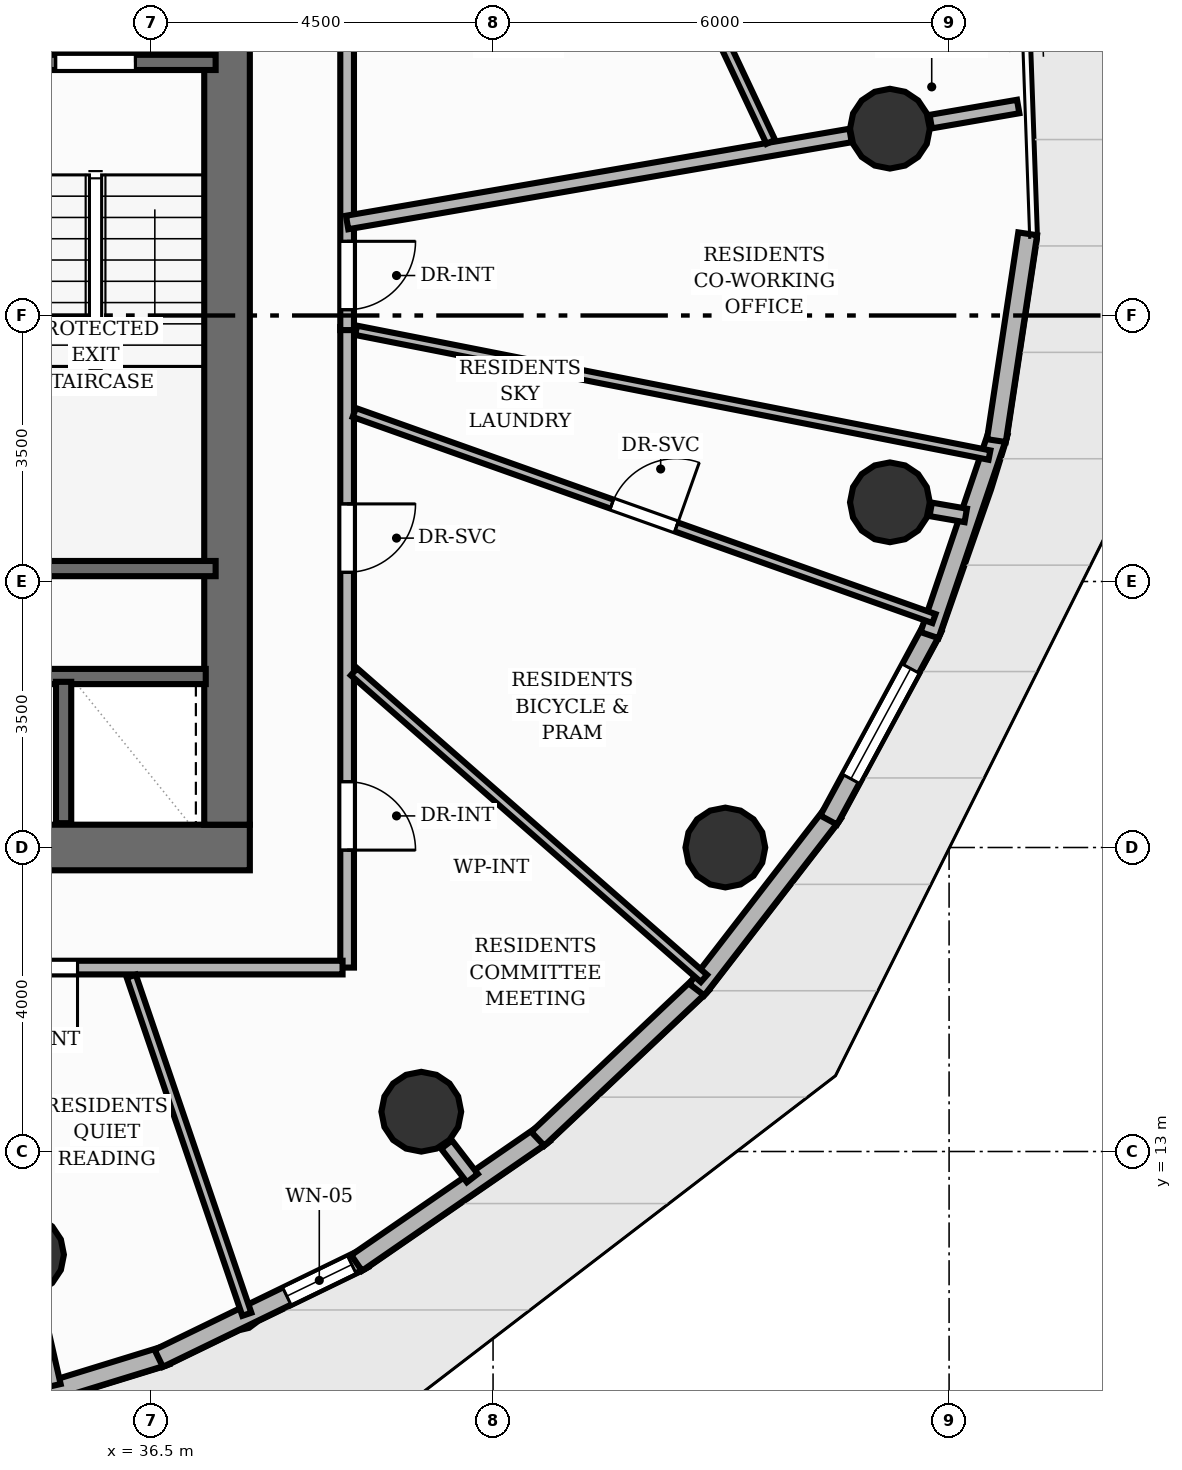
"""IFC4 building model, lengths in metres.
Left out: names, types, materials, properties, quantities, classifications, styles, units other than length and angle.
Written with IfcOpenShell. Run it as: python <this file> out.ifc"""

import sys

from ifc_helpers import new_model, si_unit, direction, frame, frame_2d, origin, origin_2d, place, context, subcontext, project, spatial, rectangle, circle, extrude, element, fill, save


model = new_model("IFC4")
c1 = context("Model", 3, precision=1e-05, world=origin(), true_north=direction((0.0, 1.0)))
c2 = subcontext(c1, "Body", "Model", "MODEL_VIEW")
j1 = project(units=[si_unit("LENGTHUNIT", "METRE"), si_unit("PLANEANGLEUNIT", "RADIAN")], contexts=[c1])
p1 = place(None, origin())
s1 = spatial("IfcSite", under=j1, at=p1, CompositionType="ELEMENT")
p2 = place(p1, origin())
s2 = spatial("IfcBuilding", under=s1, at=p2, CompositionType="ELEMENT")
p3 = place(p2, frame((0.0, 0.0, 123.36)))
s3 = spatial("IfcBuildingStorey", under=s2, at=p3, CompositionType="ELEMENT", Elevation=123.36)
p4 = place(p3, frame((22.7, 17.0, 0.0), z_axis=(0.0, 0.0, 1.0), x_axis=(1.0, 0.0, 0.0)))
e1 = element("IfcWall", 1, at=p4, inside=s3, PredefinedType="SHEAR", context=c2, shape_type="SweptSolid", body=[
    extrude(rectangle(XDim=15.1, YDim=0.6, at=frame_2d((7.55, 0.0))), origin(), (0.0, 0.0, 1.0), 3.2),
])
p5 = place(p4, frame((5.8, 0.0, 0.0)))
e2 = element("IfcOpeningElement", 2, at=p5, cuts=e1, PredefinedType="OPENING", context=c2, shape_type="SweptSolid", body=[
    extrude(rectangle(XDim=1.1, YDim=2.15, at=frame_2d((0.55, 1.075))), frame((0.0, 0.31, 0.0), z_axis=(0.0, -1.0, 0.0), x_axis=(1.0, 0.0, 0.0)), (0.0, 0.0, 1.0), 0.62),
])
p6 = place(p4, frame((9.35, 0.0, 0.0)))
e3 = element("IfcOpeningElement", 3, at=p6, cuts=e1, PredefinedType="OPENING", context=c2, shape_type="SweptSolid", body=[
    extrude(rectangle(XDim=0.9, YDim=2.1, at=frame_2d((0.45, 1.05))), frame((0.0, 0.31, 0.0), z_axis=(0.0, -1.0, 0.0), x_axis=(1.0, 0.0, 0.0)), (0.0, 0.0, 1.0), 0.62),
])
p7 = place(p3, frame((37.5, 17.3, 0.0), z_axis=(0.0, 0.0, 1.0), x_axis=(0.0, 1.0, 0.0)))
e4 = element("IfcWall", 4, at=p7, inside=s3, PredefinedType="SHEAR", context=c2, shape_type="SweptSolid", body=[
    extrude(rectangle(XDim=13.4, YDim=0.6, at=frame_2d((6.7, 0.0))), origin(), (0.0, 0.0, 1.0), 3.2),
])
for number, where, z_axis, x_axis in (
    (5, (46.221, 26.458, 0.0), (0.0, 0.0, 1.0), (1.0, 0.0, 0.0)),
    (6, (34.829, 11.642, 0.0), (0.0, 0.0, 1.0), (1.0, 0.0, 0.0)),
    (7, (40.056, 13.523, 0.0), (0.0, 0.0, 1.0), (1.0, 0.0, 0.0)),
    (8, (44.056, 17.0, 0.0), (0.0, 0.0, 1.0), (1.0, 0.0, 0.0)),
    (9, (46.221, 21.542, 0.0), (0.0, 0.0, 1.0), (1.0, 0.0, 0.0)),
):
    element("IfcColumn", number, at=place(p3, frame(where, z_axis=z_axis, x_axis=x_axis)), inside=s3, PredefinedType="COLUMN", context=c2, shape_type="SweptSolid", body=[
        extrude(circle(Radius=0.525, at=origin_2d()), origin(), (0.0, 0.0, 1.0), 3.2),
    ])
p8 = place(p3, frame((36.702, 10.319, 0.0), z_axis=(0.0, 0.0, 1.0), x_axis=(-0.955653025963, -0.294494981227, 0.0)))
e10 = element("IfcWall", 10, at=p8, inside=s3, PredefinedType="SOLIDWALL", context=c2, shape_type="SweptSolid", body=[
    extrude(rectangle(XDim=2.977, YDim=0.25, at=frame_2d((1.489, 0.0))), origin(), (0.0, 0.0, 1.0), 2.96),
])
p9 = place(p3, frame((39.299, 11.588, 0.0), z_axis=(0.0, 0.0, 1.0), x_axis=(-0.899657133161, -0.436597117206, 0.0)))
e11 = element("IfcWall", 11, at=p9, inside=s3, PredefinedType="SOLIDWALL", context=c2, shape_type="SweptSolid", body=[
    extrude(rectangle(XDim=2.998, YDim=0.25, at=frame_2d((1.499, 0.0))), origin(), (0.0, 0.0, 1.0), 2.96),
])
p10 = place(p9, frame((0.175, 0.0, 0.85)))
e12 = element("IfcOpeningElement", 12, at=p10, cuts=e11, PredefinedType="OPENING", context=c2, shape_type="SweptSolid", body=[
    extrude(rectangle(XDim=0.95, YDim=1.45, at=frame_2d((0.475, 0.725))), frame((0.0, 0.135, 0.0), z_axis=(0.0, -1.0, 0.0), x_axis=(1.0, 0.0, 0.0)), (0.0, 0.0, 1.0), 0.27),
])
p11 = place(p3, frame((41.673, 13.235, 0.0), z_axis=(0.0, 0.0, 1.0), x_axis=(-0.823228532994, -0.567710121863, 0.0)))
e13 = element("IfcWall", 13, at=p11, inside=s3, PredefinedType="SOLIDWALL", context=c2, shape_type="SweptSolid", body=[
    extrude(rectangle(XDim=2.998, YDim=0.25, at=frame_2d((1.499, 0.0))), origin(), (0.0, 0.0, 1.0), 2.96),
])
p12 = place(p3, frame((43.753, 15.211, 0.0), z_axis=(0.0, 0.0, 1.0), x_axis=(-0.727113217486, -0.686517566386, 0.0)))
e14 = element("IfcWall", 14, at=p12, inside=s3, PredefinedType="SOLIDWALL", context=c2, shape_type="SweptSolid", body=[
    extrude(rectangle(XDim=2.977, YDim=0.25, at=frame_2d((1.488, 0.0))), origin(), (0.0, 0.0, 1.0), 2.96),
])
p13 = place(p3, frame((45.475, 17.454, 0.0), z_axis=(0.0, 0.0, 1.0), x_axis=(-0.611416743811, -0.791308767415, 0.0)))
e15 = element("IfcWall", 15, at=p13, inside=s3, PredefinedType="SOLIDWALL", context=c2, shape_type="SweptSolid", body=[
    extrude(rectangle(XDim=2.937, YDim=0.25, at=frame_2d((1.468, 0.0))), origin(), (0.0, 0.0, 1.0), 2.96),
])
p14 = place(p3, frame((46.787, 19.896, 0.0), z_axis=(0.0, 0.0, 1.0), x_axis=(-0.476018404115, -0.879435318226, 0.0)))
e16 = element("IfcWall", 16, at=p14, inside=s3, PredefinedType="SOLIDWALL", context=c2, shape_type="SweptSolid", body=[
    extrude(rectangle(XDim=2.882, YDim=0.25, at=frame_2d((1.441, 0.0))), origin(), (0.0, 0.0, 1.0), 2.96),
])
p15 = place(p14, frame((0.616, 0.0, 0.85)))
e17 = element("IfcOpeningElement", 17, at=p15, cuts=e16, PredefinedType="OPENING", context=c2, shape_type="SweptSolid", body=[
    extrude(rectangle(XDim=1.65, YDim=1.55, at=frame_2d((0.825, 0.775))), frame((0.0, 0.135, 0.0), z_axis=(0.0, -1.0, 0.0), x_axis=(1.0, 0.0, 0.0)), (0.0, 0.0, 1.0), 0.27),
])
p16 = place(p3, frame((47.649, 22.462, 0.0), z_axis=(0.0, 0.0, 1.0), x_axis=(-0.321473951892, -0.946918422175, 0.0)))
e18 = element("IfcWall", 18, at=p16, inside=s3, PredefinedType="SOLIDWALL", context=c2, shape_type="SweptSolid", body=[
    extrude(rectangle(XDim=2.818, YDim=0.25, at=frame_2d((1.409, 0.0))), origin(), (0.0, 0.0, 1.0), 2.96),
])
p17 = place(p3, frame((48.034, 25.075, 0.0), z_axis=(0.0, 0.0, 1.0), x_axis=(-0.149576734229, -0.988750120393, 0.0)))
e19 = element("IfcWall", 19, at=p17, inside=s3, PredefinedType="SOLIDWALL", context=c2, shape_type="SweptSolid", body=[
    extrude(rectangle(XDim=2.752, YDim=0.25, at=frame_2d((1.376, 0.0))), origin(), (0.0, 0.0, 1.0), 2.96),
])
p18 = place(p3, frame((34.11, 20.67, 0.0), z_axis=(0.0, 0.0, 1.0), x_axis=(1.0, 0.0, 0.0)))
e20 = element("IfcWall", 20, at=p18, inside=s3, PredefinedType="SHEAR", context=c2, shape_type="SweptSolid", body=[
    extrude(rectangle(XDim=3.24, YDim=0.2, at=frame_2d((1.62, 0.0))), origin(), (0.0, 0.0, 1.0), 3.2),
])
p19 = place(p3, frame((34.11, 27.33, 0.0), z_axis=(0.0, 0.0, 1.0), x_axis=(1.0, 0.0, 0.0)))
e21 = element("IfcWall", 21, at=p19, inside=s3, PredefinedType="SHEAR", context=c2, shape_type="SweptSolid", body=[
    extrude(rectangle(XDim=3.24, YDim=0.2, at=frame_2d((1.62, 0.0))), origin(), (0.0, 0.0, 1.0), 3.2),
])
p20 = place(p19, frame((1.135, 0.0, 0.0)))
e22 = element("IfcOpeningElement", 22, at=p20, cuts=e21, PredefinedType="OPENING", context=c2, shape_type="SweptSolid", body=[
    extrude(rectangle(XDim=1.05, YDim=2.15, at=frame_2d((0.525, 1.075))), frame((0.0, 0.11, 0.0), z_axis=(0.0, -1.0, 0.0), x_axis=(1.0, 0.0, 0.0)), (0.0, 0.0, 1.0), 0.22),
])
p21 = place(p3, frame((33.5, 19.25, 0.0), z_axis=(0.0, 0.0, 1.0), x_axis=(1.0, 0.0, 0.0)))
e23 = element("IfcWall", 23, at=p21, inside=s3, PredefinedType="SHEAR", context=c2, shape_type="SweptSolid", body=[
    extrude(rectangle(XDim=3.72, YDim=0.2, at=frame_2d((1.86, 0.0))), origin(), (0.0, 0.0, 1.0), 3.2),
])
p22 = place(p3, frame((35.35, 17.32, 0.0), z_axis=(0.0, 0.0, 1.0), x_axis=(0.0, 1.0, 0.0)))
e24 = element("IfcWall", 24, at=p22, inside=s3, PredefinedType="SHEAR", context=c2, shape_type="SweptSolid", body=[
    extrude(rectangle(XDim=1.86, YDim=0.2, at=frame_2d((0.93, 0.0))), origin(), (0.0, 0.0, 1.0), 3.2),
])
p23 = place(p3, frame((46.758, 26.551, 0.0), z_axis=(0.0, 0.0, 1.0), x_axis=(0.98537549431, 0.170396992969, 0.0)))
e25 = element("IfcWall", 25, at=p23, inside=s3, PredefinedType="PARTITIONING", context=c2, shape_type="SweptSolid", body=[
    extrude(rectangle(XDim=1.168, YDim=0.18, at=frame_2d((0.584, 0.0))), origin(), (0.0, 0.0, 1.0), 2.336),
])
p24 = place(p3, frame((34.95, 11.111, 0.0), z_axis=(0.0, 0.0, 1.0), x_axis=(0.223107064029, -0.974793946422, 0.0)))
e26 = element("IfcWall", 26, at=p24, inside=s3, PredefinedType="PARTITIONING", context=c2, shape_type="SweptSolid", body=[
    extrude(rectangle(XDim=1.221, YDim=0.18, at=frame_2d((0.611, 0.0))), origin(), (0.0, 0.0, 1.0), 2.336),
])
p25 = place(p3, frame((40.388, 13.092, 0.0), z_axis=(0.0, 0.0, 1.0), x_axis=(0.609498830183, -0.792786967605, 0.0)))
e27 = element("IfcWall", 27, at=p25, inside=s3, PredefinedType="PARTITIONING", context=c2, shape_type="SweptSolid", body=[
    extrude(rectangle(XDim=0.557, YDim=0.18, at=frame_2d((0.278, 0.0))), origin(), (0.0, 0.0, 1.0), 2.336),
])
p26 = place(p3, frame((46.758, 21.449, 0.0), z_axis=(0.0, 0.0, 1.0), x_axis=(0.985345448397, -0.170570651999, 0.0)))
e28 = element("IfcWall", 28, at=p26, inside=s3, PredefinedType="PARTITIONING", context=c2, shape_type="SweptSolid", body=[
    extrude(rectangle(XDim=0.468, YDim=0.18, at=frame_2d((0.234, 0.0))), origin(), (0.0, 0.0, 1.0), 2.336),
])
p27 = place(p3, frame((39.08, 23.848, 0.0), z_axis=(0.0, 0.0, 1.0), x_axis=(0.0, -1.0, 0.0)))
e29 = element("IfcWall", 29, at=p27, inside=s3, PredefinedType="PARTITIONING", context=c2, shape_type="SweptSolid", body=[
    extrude(rectangle(XDim=8.428, YDim=0.18, at=frame_2d((4.214, 0.0))), origin(), (0.0, 0.0, 1.0), 2.955),
])
p28 = place(p27, frame((2.327, 0.0, 0.0)))
e30 = element("IfcOpeningElement", 30, at=p28, cuts=e29, PredefinedType="OPENING", context=c2, shape_type="SweptSolid", body=[
    extrude(rectangle(XDim=0.9, YDim=2.1, at=frame_2d((0.45, 1.05))), frame((0.0, 0.1, 0.0), z_axis=(0.0, -1.0, 0.0), x_axis=(1.0, 0.0, 0.0)), (0.0, 0.0, 1.0), 0.2),
])
p29 = place(p27, frame((5.983, 0.0, 0.0)))
e31 = element("IfcOpeningElement", 31, at=p29, cuts=e29, PredefinedType="OPENING", context=c2, shape_type="SweptSolid", body=[
    extrude(rectangle(XDim=0.9, YDim=2.1, at=frame_2d((0.45, 1.05))), frame((0.0, 0.1, 0.0), z_axis=(0.0, -1.0, 0.0), x_axis=(1.0, 0.0, 0.0)), (0.0, 0.0, 1.0), 0.2),
])
p30 = place(p3, frame((39.02, 15.42, 0.0), z_axis=(0.0, 0.0, 1.0), x_axis=(-1.0, 0.0, 0.0)))
e32 = element("IfcWall", 32, at=p30, inside=s3, PredefinedType="PARTITIONING", context=c2, shape_type="SweptSolid", body=[
    extrude(rectangle(XDim=9.922, YDim=0.18, at=frame_2d((4.961, 0.0))), origin(), (0.0, 0.0, 1.0), 2.955),
])
p31 = place(p30, frame((3.487, 0.0, 0.0)))
e33 = element("IfcOpeningElement", 33, at=p31, cuts=e32, PredefinedType="OPENING", context=c2, shape_type="SweptSolid", body=[
    extrude(rectangle(XDim=0.9, YDim=2.1, at=frame_2d((0.45, 1.05))), frame((0.0, 0.1, 0.0), z_axis=(0.0, -1.0, 0.0), x_axis=(1.0, 0.0, 0.0)), (0.0, 0.0, 1.0), 0.2),
])
p32 = place(p30, frame((6.571, 0.0, 0.0)))
e34 = element("IfcOpeningElement", 34, at=p32, cuts=e32, PredefinedType="OPENING", context=c2, shape_type="SweptSolid", body=[
    extrude(rectangle(XDim=0.9, YDim=2.1, at=frame_2d((0.45, 1.05))), frame((0.0, 0.1, 0.0), z_axis=(0.0, -1.0, 0.0), x_axis=(1.0, 0.0, 0.0)), (0.0, 0.0, 1.0), 0.2),
])
p33 = place(p3, frame((39.08, 30.158, 0.0), z_axis=(0.0, 0.0, 1.0), x_axis=(0.0, -1.0, 0.0)))
e35 = element("IfcWall", 35, at=p33, inside=s3, PredefinedType="PARTITIONING", context=c2, shape_type="SweptSolid", body=[
    extrude(rectangle(XDim=6.35, YDim=0.18, at=frame_2d((3.175, 0.0))), origin(), (0.0, 0.0, 1.0), 2.955),
])
p34 = place(p33, frame((5.182, 0.0, 0.0)))
e36 = element("IfcOpeningElement", 36, at=p34, cuts=e35, PredefinedType="OPENING", context=c2, shape_type="SweptSolid", body=[
    extrude(rectangle(XDim=0.9, YDim=2.1, at=frame_2d((0.45, 1.05))), frame((0.0, 0.1, 0.0), z_axis=(0.0, -1.0, 0.0), x_axis=(1.0, 0.0, 0.0)), (0.0, 0.0, 1.0), 0.2),
])
p35 = place(p3, frame((43.775, 15.277, 0.0), z_axis=(0.0, 0.0, 1.0), x_axis=(-0.752092313191, 0.659057776252, 0.0)))
e37 = element("IfcWall", 37, at=p35, inside=s3, PredefinedType="PARTITIONING", context=c2, shape_type="SweptSolid", body=[
    extrude(rectangle(XDim=6.122, YDim=0.125, at=frame_2d((3.061, 0.0))), origin(), (0.0, 0.0, 1.0), 2.955),
])
p36 = place(p3, frame((39.174, 22.723, 0.0), z_axis=(0.0, 0.0, 1.0), x_axis=(0.942245152982, -0.334923978959, 0.0)))
e38 = element("IfcWall", 38, at=p36, inside=s3, PredefinedType="PARTITIONING", context=c2, shape_type="SweptSolid", body=[
    extrude(rectangle(XDim=8.094, YDim=0.125, at=frame_2d((4.047, 0.0))), origin(), (0.0, 0.0, 1.0), 2.336),
])
p37 = place(p36, frame((3.597, 0.0, 0.0)))
e39 = element("IfcOpeningElement", 39, at=p37, cuts=e38, PredefinedType="OPENING", context=c2, shape_type="SweptSolid", body=[
    extrude(rectangle(XDim=0.9, YDim=2.1, at=frame_2d((0.45, 1.05))), frame((0.0, 0.073, 0.0), z_axis=(0.0, -1.0, 0.0), x_axis=(1.0, 0.0, 0.0)), (0.0, 0.0, 1.0), 0.145),
])
p38 = place(p3, frame((37.76, 10.858, 0.0), z_axis=(0.0, 0.0, 1.0), x_axis=(-0.323447862149, 0.946245993635, 0.0)))
e40 = element("IfcWall", 40, at=p38, inside=s3, PredefinedType="PARTITIONING", context=c2, shape_type="SweptSolid", body=[
    extrude(rectangle(XDim=4.701, YDim=0.125, at=frame_2d((2.351, 0.0))), origin(), (0.0, 0.0, 1.0), 2.955),
])
p39 = place(p3, frame((47.531, 22.163, 0.0), z_axis=(0.0, 0.0, 1.0), x_axis=(-0.981139353497, 0.19330175638, 0.0)))
e41 = element("IfcWall", 41, at=p39, inside=s3, PredefinedType="PARTITIONING", context=c2, shape_type="SweptSolid", body=[
    extrude(rectangle(XDim=8.494, YDim=0.125, at=frame_2d((4.247, 0.0))), origin(), (0.0, 0.0, 1.0), 2.692),
])
p40 = place(p3, frame((39.08, 25.224, 0.0), z_axis=(0.0, 0.0, 1.0), x_axis=(0.985384524795, 0.17034476304, 0.0)))
e42 = element("IfcWall", 42, at=p40, inside=s3, PredefinedType="PARTITIONING", context=c2, shape_type="SweptSolid", body=[
    extrude(rectangle(XDim=6.722, YDim=0.18, at=frame_2d((3.361, 0.0))), origin(), (0.0, 0.0, 1.0), 2.336),
])
p41 = place(p3, frame((44.653, 26.285, 0.0), z_axis=(0.0, 0.0, 1.0), x_axis=(-0.426326363779, 0.90456941776, 0.0)))
e43 = element("IfcWall", 43, at=p41, inside=s3, PredefinedType="PARTITIONING", context=c2, shape_type="SweptSolid", body=[
    extrude(rectangle(XDim=6.729, YDim=0.125, at=frame_2d((3.365, 0.0))), origin(), (0.0, 0.0, 1.0), 2.955),
])
p42 = place(p10, origin())
e44 = element("IfcWindow", 44, at=p42, inside=s3, PartitioningType="SINGLE_PANEL", PredefinedType="WINDOW", context=c2, shape_type="SweptSolid", body=[
    extrude(rectangle(XDim=0.95, YDim=1.45, at=frame_2d((0.475, 0.725))), frame((0.0, 0.03, 0.0), z_axis=(0.0, -1.0, 0.0), x_axis=(1.0, 0.0, 0.0)), (0.0, 0.0, 1.0), 0.06),
])
fill(e12, e44)
p43 = place(p15, origin())
e45 = element("IfcWindow", 45, at=p43, inside=s3, PartitioningType="SINGLE_PANEL", PredefinedType="WINDOW", context=c2, shape_type="SweptSolid", body=[
    extrude(rectangle(XDim=1.65, YDim=1.55, at=frame_2d((0.825, 0.775))), frame((0.0, 0.03, 0.0), z_axis=(0.0, -1.0, 0.0), x_axis=(1.0, 0.0, 0.0)), (0.0, 0.0, 1.0), 0.06),
])
fill(e17, e45)
p44 = place(p20, origin())
e46 = element("IfcDoor", 46, at=p44, inside=s3, OperationType="SINGLE_SWING_RIGHT", PredefinedType="DOOR", context=c2, shape_type="SweptSolid", body=[
    extrude(rectangle(XDim=1.05, YDim=2.15, at=frame_2d((0.525, 1.075))), frame((0.0, 0.025, 0.0), z_axis=(0.0, -1.0, 0.0), x_axis=(1.0, 0.0, 0.0)), (0.0, 0.0, 1.0), 0.05),
])
fill(e22, e46)
p45 = place(p28, origin())
e47 = element("IfcDoor", 47, at=p45, inside=s3, OperationType="SINGLE_SWING_LEFT", PredefinedType="DOOR", context=c2, shape_type="SweptSolid", body=[
    extrude(rectangle(XDim=0.9, YDim=2.1, at=frame_2d((0.45, 1.05))), frame((0.0, 0.025, 0.0), z_axis=(0.0, -1.0, 0.0), x_axis=(1.0, 0.0, 0.0)), (0.0, 0.0, 1.0), 0.05),
])
fill(e30, e47)
p46 = place(p29, origin())
e48 = element("IfcDoor", 48, at=p46, inside=s3, OperationType="SINGLE_SWING_RIGHT", PredefinedType="DOOR", context=c2, shape_type="SweptSolid", body=[
    extrude(rectangle(XDim=0.9, YDim=2.1, at=frame_2d((0.45, 1.05))), frame((0.0, 0.025, 0.0), z_axis=(0.0, -1.0, 0.0), x_axis=(1.0, 0.0, 0.0)), (0.0, 0.0, 1.0), 0.05),
])
fill(e31, e48)
p47 = place(p31, origin())
e49 = element("IfcDoor", 49, at=p47, inside=s3, OperationType="SINGLE_SWING_LEFT", PredefinedType="DOOR", context=c2, shape_type="SweptSolid", body=[
    extrude(rectangle(XDim=0.9, YDim=2.1, at=frame_2d((0.45, 1.05))), frame((0.0, 0.025, 0.0), z_axis=(0.0, -1.0, 0.0), x_axis=(1.0, 0.0, 0.0)), (0.0, 0.0, 1.0), 0.05),
])
fill(e33, e49)
p48 = place(p34, origin())
e50 = element("IfcDoor", 50, at=p48, inside=s3, OperationType="SINGLE_SWING_LEFT", PredefinedType="DOOR", context=c2, shape_type="SweptSolid", body=[
    extrude(rectangle(XDim=0.9, YDim=2.1, at=frame_2d((0.45, 1.05))), frame((0.0, 0.025, 0.0), z_axis=(0.0, -1.0, 0.0), x_axis=(1.0, 0.0, 0.0)), (0.0, 0.0, 1.0), 0.05),
])
fill(e36, e50)
p49 = place(p37, origin())
e51 = element("IfcDoor", 51, at=p49, inside=s3, OperationType="SINGLE_SWING_RIGHT", PredefinedType="DOOR", context=c2, shape_type="SweptSolid", body=[
    extrude(rectangle(XDim=0.9, YDim=2.1, at=frame_2d((0.45, 1.05))), frame((0.0, 0.025, 0.0), z_axis=(0.0, -1.0, 0.0), x_axis=(1.0, 0.0, 0.0)), (0.0, 0.0, 1.0), 0.05),
])
fill(e39, e51)
save(model, sys.argv[1])
